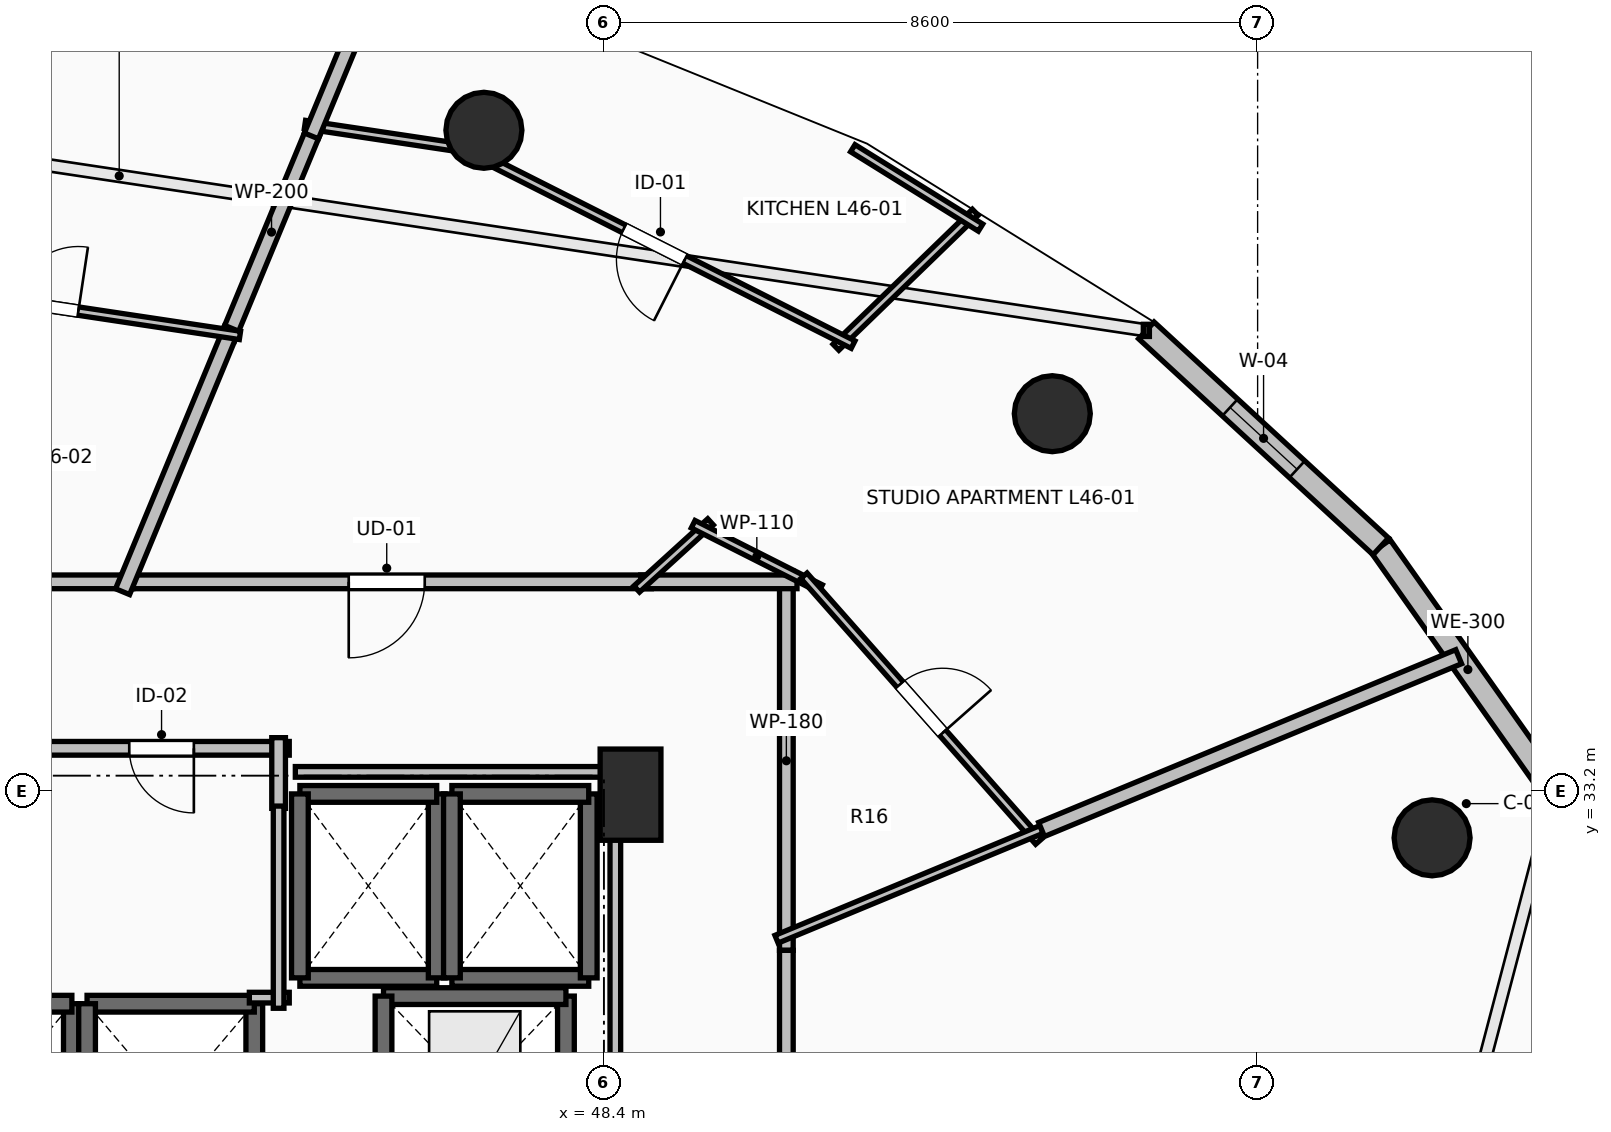
"""IFC4 building model, lengths in metres.
Left out: names, types, materials, properties, quantities, classifications, styles, units other than length and angle.
Written with IfcOpenShell. Run it as: python <this file> out.ifc"""

import sys

from ifc_helpers import new_model, si_unit, direction, frame, frame_2d, origin, origin_2d, place, context, subcontext, project, spatial, rectangle, circle, extrude, element, fill, save


model = new_model("IFC4")
c1 = context("Model", 3, precision=1e-05, world=origin(), true_north=direction((0.0, 1.0)))
c2 = subcontext(c1, "Body", "Model", "MODEL_VIEW")
j1 = project(units=[si_unit("LENGTHUNIT", "METRE"), si_unit("PLANEANGLEUNIT", "RADIAN")], contexts=[c1])
p1 = place(None, origin())
s1 = spatial("IfcSite", under=j1, at=p1, CompositionType="ELEMENT")
p2 = place(p1, origin())
s2 = spatial("IfcBuilding", under=s1, at=p2, CompositionType="ELEMENT")
p3 = place(p2, frame((0.0, 0.0, 171.1)))
s3 = spatial("IfcBuildingStorey", under=s2, at=p3, CompositionType="ELEMENT", Elevation=171.1)
for number, where, z_axis, x_axis in (
    (1, (59.295, 32.582, 0.0), (0.0, 0.0, 1.0), (0.924, 0.383, 0.0)),
    (2, (54.299, 38.162, 0.0), (0.0, 0.0, 1.0), (0.707, 0.707, 0.0)),
    (3, (46.821, 41.891, 0.0), (0.0, 0.0, 1.0), (0.383, 0.924, 0.0)),
):
    element("IfcColumn", number, at=place(p3, frame(where, z_axis=z_axis, x_axis=x_axis)), inside=s3, PredefinedType="COLUMN", context=c2, shape_type="SweptSolid", body=[
        extrude(circle(Radius=0.5, at=origin_2d()), origin(), (0.0, 0.0, 1.0), 3.5),
    ])
p4 = place(p3, frame((48.75, 33.15, 0.0), z_axis=(0.0, 0.0, 1.0), x_axis=(1.0, 0.0, 0.0)))
e4 = element("IfcColumn", 4, at=p4, inside=s3, PredefinedType="PILASTER", context=c2, shape_type="SweptSolid", body=[
    extrude(rectangle(XDim=0.8, YDim=1.2, at=origin_2d()), origin(), (0.0, 0.0, 1.0), 3.5),
])
p5 = place(p3, frame((60.912, 33.175, 0.0), z_axis=(0.0, 0.0, 1.0), x_axis=(-0.577269753207, 0.816553508371, 0.0)))
e5 = element("IfcWall", 5, at=p5, inside=s3, PredefinedType="STANDARD", context=c2, shape_type="SweptSolid", body=[
    extrude(rectangle(XDim=3.97, YDim=0.3, at=frame_2d((1.985, 0.0))), origin(), (0.0, 0.0, 1.0), 3.2),
])
p6 = place(p3, frame((58.62, 36.417, 0.0), z_axis=(0.0, 0.0, 1.0), x_axis=(-0.735477154165, 0.677549522693, 0.0)))
e6 = element("IfcWall", 6, at=p6, inside=s3, PredefinedType="STANDARD", context=c2, shape_type="SweptSolid", body=[
    extrude(rectangle(XDim=4.194, YDim=0.3, at=frame_2d((2.097, 0.0))), origin(), (0.0, 0.0, 1.0), 3.2),
])
p7 = place(p6, frame((1.497, 0.0, 0.85)))
e7 = element("IfcOpeningElement", 7, at=p7, cuts=e6, PredefinedType="OPENING", context=c2, shape_type="SweptSolid", body=[
    extrude(rectangle(XDim=1.2, YDim=1.95, at=frame_2d((0.6, 0.975))), frame((0.0, 0.165, 0.0), z_axis=(0.0, -1.0, 0.0), x_axis=(1.0, 0.0, 0.0)), (0.0, 0.0, 1.0), 0.33),
])
p8 = place(p3, frame((41.4, 27.8, 0.0), z_axis=(0.0, 0.0, 1.0), x_axis=(0.0, 1.0, 0.0)))
e8 = element("IfcWall", 8, at=p8, inside=s3, PredefinedType="SOLIDWALL", context=c2, shape_type="SweptSolid", body=[
    extrude(rectangle(XDim=2.6, YDim=0.22, at=frame_2d((1.3, 0.0))), origin(), (0.0, 0.0, 1.0), 3.2),
])
p9 = place(p3, frame((41.4, 30.4, 0.0), z_axis=(0.0, 0.0, 1.0), x_axis=(-1.0, 0.0, 0.0)))
e9 = element("IfcWall", 9, at=p9, inside=s3, PredefinedType="SOLIDWALL", context=c2, shape_type="SweptSolid", body=[
    extrude(rectangle(XDim=2.2, YDim=0.22, at=frame_2d((1.1, 0.0))), origin(), (0.0, 0.0, 1.0), 3.2),
])
p10 = place(p3, frame((43.8, 27.8, 0.0), z_axis=(0.0, 0.0, 1.0), x_axis=(0.0, 1.0, 0.0)))
e10 = element("IfcWall", 10, at=p10, inside=s3, PredefinedType="SOLIDWALL", context=c2, shape_type="SweptSolid", body=[
    extrude(rectangle(XDim=2.6, YDim=0.22, at=frame_2d((1.3, 0.0))), origin(), (0.0, 0.0, 1.0), 3.2),
])
p11 = place(p3, frame((43.8, 30.4, 0.0), z_axis=(0.0, 0.0, 1.0), x_axis=(-1.0, 0.0, 0.0)))
e11 = element("IfcWall", 11, at=p11, inside=s3, PredefinedType="SOLIDWALL", context=c2, shape_type="SweptSolid", body=[
    extrude(rectangle(XDim=2.2, YDim=0.22, at=frame_2d((1.1, 0.0))), origin(), (0.0, 0.0, 1.0), 3.2),
])
p12 = place(p3, frame((41.6, 30.4, 0.0), z_axis=(0.0, 0.0, 1.0), x_axis=(0.0, -1.0, 0.0)))
e12 = element("IfcWall", 12, at=p12, inside=s3, PredefinedType="SOLIDWALL", context=c2, shape_type="SweptSolid", body=[
    extrude(rectangle(XDim=2.6, YDim=0.22, at=frame_2d((1.3, 0.0))), origin(), (0.0, 0.0, 1.0), 3.2),
])
p13 = place(p3, frame((44.4, 30.74, 0.0), z_axis=(0.0, 0.0, 1.0), x_axis=(1.0, 0.0, 0.0)))
e13 = element("IfcWall", 13, at=p13, inside=s3, PredefinedType="SOLIDWALL", context=c2, shape_type="SweptSolid", body=[
    extrude(rectangle(XDim=1.8, YDim=0.22, at=frame_2d((0.9, 0.0))), origin(), (0.0, 0.0, 1.0), 3.2),
])
p14 = place(p3, frame((46.2, 30.74, 0.0), z_axis=(0.0, 0.0, 1.0), x_axis=(0.0, 1.0, 0.0)))
e14 = element("IfcWall", 14, at=p14, inside=s3, PredefinedType="SOLIDWALL", context=c2, shape_type="SweptSolid", body=[
    extrude(rectangle(XDim=2.42, YDim=0.22, at=frame_2d((1.21, 0.0))), origin(), (0.0, 0.0, 1.0), 3.2),
])
p15 = place(p3, frame((46.2, 33.16, 0.0), z_axis=(0.0, 0.0, 1.0), x_axis=(-1.0, 0.0, 0.0)))
e15 = element("IfcWall", 15, at=p15, inside=s3, PredefinedType="SOLIDWALL", context=c2, shape_type="SweptSolid", body=[
    extrude(rectangle(XDim=1.8, YDim=0.22, at=frame_2d((0.9, 0.0))), origin(), (0.0, 0.0, 1.0), 3.2),
])
p16 = place(p3, frame((44.4, 33.16, 0.0), z_axis=(0.0, 0.0, 1.0), x_axis=(0.0, -1.0, 0.0)))
e16 = element("IfcWall", 16, at=p16, inside=s3, PredefinedType="SOLIDWALL", context=c2, shape_type="SweptSolid", body=[
    extrude(rectangle(XDim=2.42, YDim=0.22, at=frame_2d((1.21, 0.0))), origin(), (0.0, 0.0, 1.0), 3.2),
])
p17 = place(p3, frame((46.4, 30.74, 0.0), z_axis=(0.0, 0.0, 1.0), x_axis=(1.0, 0.0, 0.0)))
e17 = element("IfcWall", 17, at=p17, inside=s3, PredefinedType="SOLIDWALL", context=c2, shape_type="SweptSolid", body=[
    extrude(rectangle(XDim=1.8, YDim=0.22, at=frame_2d((0.9, 0.0))), origin(), (0.0, 0.0, 1.0), 3.2),
])
p18 = place(p3, frame((48.2, 30.74, 0.0), z_axis=(0.0, 0.0, 1.0), x_axis=(0.0, 1.0, 0.0)))
e18 = element("IfcWall", 18, at=p18, inside=s3, PredefinedType="SOLIDWALL", context=c2, shape_type="SweptSolid", body=[
    extrude(rectangle(XDim=2.42, YDim=0.22, at=frame_2d((1.21, 0.0))), origin(), (0.0, 0.0, 1.0), 3.2),
])
p19 = place(p3, frame((48.2, 33.16, 0.0), z_axis=(0.0, 0.0, 1.0), x_axis=(-1.0, 0.0, 0.0)))
e19 = element("IfcWall", 19, at=p19, inside=s3, PredefinedType="SOLIDWALL", context=c2, shape_type="SweptSolid", body=[
    extrude(rectangle(XDim=1.8, YDim=0.22, at=frame_2d((0.9, 0.0))), origin(), (0.0, 0.0, 1.0), 3.2),
])
p20 = place(p3, frame((46.4, 33.16, 0.0), z_axis=(0.0, 0.0, 1.0), x_axis=(0.0, -1.0, 0.0)))
e20 = element("IfcWall", 20, at=p20, inside=s3, PredefinedType="SOLIDWALL", context=c2, shape_type="SweptSolid", body=[
    extrude(rectangle(XDim=2.42, YDim=0.22, at=frame_2d((1.21, 0.0))), origin(), (0.0, 0.0, 1.0), 3.2),
])
p21 = place(p3, frame((47.9, 28.0, 0.0), z_axis=(0.0, 0.0, 1.0), x_axis=(0.0, 1.0, 0.0)))
e21 = element("IfcWall", 21, at=p21, inside=s3, PredefinedType="SHEAR", context=c2, shape_type="SweptSolid", body=[
    extrude(rectangle(XDim=2.5, YDim=0.22, at=frame_2d((1.25, 0.0))), origin(), (0.0, 0.0, 1.0), 3.2),
])
p22 = place(p3, frame((47.9, 30.5, 0.0), z_axis=(0.0, 0.0, 1.0), x_axis=(-1.0, 0.0, 0.0)))
e22 = element("IfcWall", 22, at=p22, inside=s3, PredefinedType="SHEAR", context=c2, shape_type="SweptSolid", body=[
    extrude(rectangle(XDim=2.4, YDim=0.22, at=frame_2d((1.2, 0.0))), origin(), (0.0, 0.0, 1.0), 3.2),
])
p23 = place(p3, frame((45.5, 30.5, 0.0), z_axis=(0.0, 0.0, 1.0), x_axis=(0.0, -1.0, 0.0)))
e23 = element("IfcWall", 23, at=p23, inside=s3, PredefinedType="SHEAR", context=c2, shape_type="SweptSolid", body=[
    extrude(rectangle(XDim=2.5, YDim=0.22, at=frame_2d((1.25, 0.0))), origin(), (0.0, 0.0, 1.0), 3.2),
])
p24 = place(p3, frame((44.26, 33.76, 0.0), z_axis=(0.0, 0.0, 1.0), x_axis=(-1.0, 0.0, 0.0)))
e24 = element("IfcWall", 24, at=p24, inside=s3, PredefinedType="PARTITIONING", context=c2, shape_type="SweptSolid", body=[
    extrude(rectangle(XDim=3.36, YDim=0.18, at=frame_2d((1.68, 0.0))), origin(), (0.0, 0.0, 1.0), 3.2),
])
p25 = place(p24, frame((1.255, 0.0, 0.0)))
e25 = element("IfcOpeningElement", 25, at=p25, cuts=e24, PredefinedType="OPENING", context=c2, shape_type="SweptSolid", body=[
    extrude(rectangle(XDim=0.85, YDim=2.1, at=frame_2d((0.425, 1.05))), frame((0.0, 0.105, 0.0), z_axis=(0.0, -1.0, 0.0), x_axis=(1.0, 0.0, 0.0)), (0.0, 0.0, 1.0), 0.21),
])
p26 = place(p3, frame((44.12, 32.97, 0.0), z_axis=(0.0, 0.0, 1.0), x_axis=(0.0, 1.0, 0.0)))
e26 = element("IfcWall", 26, at=p26, inside=s3, PredefinedType="PARTITIONING", context=c2, shape_type="SweptSolid", body=[
    extrude(rectangle(XDim=0.93, YDim=0.18, at=frame_2d((0.465, 0.0))), origin(), (0.0, 0.0, 1.0), 3.2),
])
p27 = place(p3, frame((49.024, 35.95, 0.0), z_axis=(0.0, 0.0, 1.0), x_axis=(-1.0, 0.0, 0.0)))
e27 = element("IfcWall", 27, at=p27, inside=s3, PredefinedType="PARTITIONING", context=c2, shape_type="SweptSolid", body=[
    extrude(rectangle(XDim=6.963, YDim=0.18, at=frame_2d((3.481, 0.0))), origin(), (0.0, 0.0, 1.0), 2.392),
])
p28 = place(p27, frame((2.981, 0.0, 0.0)))
e28 = element("IfcOpeningElement", 28, at=p28, cuts=e27, PredefinedType="OPENING", context=c2, shape_type="SweptSolid", body=[
    extrude(rectangle(XDim=1.0, YDim=2.15, at=frame_2d((0.5, 1.075))), frame((0.0, 0.105, 0.0), z_axis=(0.0, -1.0, 0.0), x_axis=(1.0, 0.0, 0.0)), (0.0, 0.0, 1.0), 0.21),
])
p29 = place(p3, frame((50.8, 31.102, 0.0), z_axis=(0.0, 0.0, 1.0), x_axis=(0.0, 1.0, 0.0)))
e29 = element("IfcWall", 29, at=p29, inside=s3, PredefinedType="PARTITIONING", context=c2, shape_type="SweptSolid", body=[
    extrude(rectangle(XDim=4.988, YDim=0.18, at=frame_2d((2.494, 0.0))), origin(), (0.0, 0.0, 1.0), 2.392),
])
p30 = place(p3, frame((50.94, 35.95, 0.0), z_axis=(0.0, 0.0, 1.0), x_axis=(-1.0, 0.0, 0.0)))
e30 = element("IfcWall", 30, at=p30, inside=s3, PredefinedType="PARTITIONING", context=c2, shape_type="SweptSolid", body=[
    extrude(rectangle(XDim=2.056, YDim=0.18, at=frame_2d((1.028, 0.0))), origin(), (0.0, 0.0, 1.0), 2.834),
])
p31 = place(p3, frame((42.201, 35.95, 0.0), z_axis=(0.0, 0.0, 1.0), x_axis=(-1.0, 0.0, 0.0)))
e31 = element("IfcWall", 31, at=p31, inside=s3, PredefinedType="PARTITIONING", context=c2, shape_type="SweptSolid", body=[
    extrude(rectangle(XDim=3.812, YDim=0.18, at=frame_2d((1.906, 0.0))), origin(), (0.0, 0.0, 1.0), 3.2),
])
p32 = place(p3, frame((50.8, 27.25, 0.0), z_axis=(0.0, 0.0, 1.0), x_axis=(0.0, 1.0, 0.0)))
e32 = element("IfcWall", 32, at=p32, inside=s3, PredefinedType="PARTITIONING", context=c2, shape_type="SweptSolid", body=[
    extrude(rectangle(XDim=3.852, YDim=0.18, at=frame_2d((1.926, 0.0))), origin(), (0.0, 0.0, 1.0), 2.392),
])
p33 = place(p3, frame((48.831, 35.856, 0.0), z_axis=(0.0, 0.0, 1.0), x_axis=(0.739696022243, 0.672941152463, 0.0)))
e33 = element("IfcWall", 33, at=p33, inside=s3, PredefinedType="PARTITIONING", context=c2, shape_type="SweptSolid", body=[
    extrude(rectangle(XDim=1.313, YDim=0.11, at=frame_2d((0.656, 0.0))), origin(), (0.0, 0.0, 1.0), 2.834),
])
p34 = place(p3, frame((49.574, 36.708, 0.0), z_axis=(0.0, 0.0, 1.0), x_axis=(0.8925722309, -0.450904438464, 0.0)))
e34 = element("IfcWall", 34, at=p34, inside=s3, PredefinedType="PARTITIONING", context=c2, shape_type="SweptSolid", body=[
    extrude(rectangle(XDim=1.877, YDim=0.11, at=frame_2d((0.938, 0.0))), origin(), (0.0, 0.0, 1.0), 3.2),
])
p35 = place(p3, frame((51.031, 36.03, 0.0), z_axis=(0.0, 0.0, 1.0), x_axis=(0.662223763999, -0.749306136632, 0.0)))
e35 = element("IfcWall", 35, at=p35, inside=s3, PredefinedType="PARTITIONING", context=c2, shape_type="SweptSolid", body=[
    extrude(rectangle(XDim=4.665, YDim=0.11, at=frame_2d((2.333, 0.0))), origin(), (0.0, 0.0, 1.0), 2.392),
])
p36 = place(p35, frame((1.908, 0.0, 0.0)))
e36 = element("IfcOpeningElement", 36, at=p36, cuts=e35, PredefinedType="OPENING", context=c2, shape_type="SweptSolid", body=[
    extrude(rectangle(XDim=0.85, YDim=2.1, at=frame_2d((0.425, 1.05))), frame((0.0, 0.07, 0.0), z_axis=(0.0, -1.0, 0.0), x_axis=(1.0, 0.0, 0.0)), (0.0, 0.0, 1.0), 0.14),
])
p37 = place(p3, frame((54.157, 32.693, 0.0), z_axis=(0.0, 0.0, 1.0), x_axis=(-0.923865440054, -0.382717452795, 0.0)))
e37 = element("IfcWall", 37, at=p37, inside=s3, PredefinedType="PARTITIONING", context=c2, shape_type="SweptSolid", body=[
    extrude(rectangle(XDim=3.774, YDim=0.11, at=frame_2d((1.887, 0.0))), origin(), (0.0, 0.0, 1.0), 2.392),
])
p38 = place(p3, frame((53.286, 40.812, 0.0), z_axis=(0.0, 0.0, 1.0), x_axis=(-0.718256654627, -0.69577825353, 0.0)))
e38 = element("IfcWall", 38, at=p38, inside=s3, PredefinedType="PARTITIONING", context=c2, shape_type="SweptSolid", body=[
    extrude(rectangle(XDim=2.552, YDim=0.11, at=frame_2d((1.276, 0.0))), origin(), (0.0, 0.0, 1.0), 2.688),
])
p39 = place(p3, frame((51.678, 39.071, 0.0), z_axis=(0.0, 0.0, 1.0), x_axis=(-0.892519613246, 0.451008580818, 0.0)))
e39 = element("IfcWall", 39, at=p39, inside=s3, PredefinedType="PARTITIONING", context=c2, shape_type="SweptSolid", body=[
    extrude(rectangle(XDim=5.861, YDim=0.11, at=frame_2d((2.93, 0.0))), origin(), (0.0, 0.0, 1.0), 2.392),
])
p40 = place(p39, frame((2.48, 0.0, 0.0)))
e40 = element("IfcOpeningElement", 40, at=p40, cuts=e39, PredefinedType="OPENING", context=c2, shape_type="SweptSolid", body=[
    extrude(rectangle(XDim=0.9, YDim=2.1, at=frame_2d((0.45, 1.05))), frame((0.0, 0.07, 0.0), z_axis=(0.0, -1.0, 0.0), x_axis=(1.0, 0.0, 0.0)), (0.0, 0.0, 1.0), 0.14),
])
p41 = place(p3, frame((46.71, 41.63, 0.0), z_axis=(0.0, 0.0, 1.0), x_axis=(-0.988930827604, 0.14837728335, 0.0)))
e41 = element("IfcWall", 41, at=p41, inside=s3, PredefinedType="PARTITIONING", context=c2, shape_type="SweptSolid", body=[
    extrude(rectangle(XDim=2.269, YDim=0.11, at=frame_2d((1.135, 0.0))), origin(), (0.0, 0.0, 1.0), 3.2),
])
p42 = place(p3, frame((53.355, 40.61, 0.0), z_axis=(0.0, 0.0, 1.0), x_axis=(-0.8493331579, 0.527857165237, 0.0)))
e42 = element("IfcWall", 42, at=p42, inside=s3, PredefinedType="PARTITIONING", context=c2, shape_type="SweptSolid", body=[
    extrude(rectangle(XDim=1.979, YDim=0.11, at=frame_2d((0.99, 0.0))), origin(), (0.0, 0.0, 1.0), 3.2),
])
p43 = place(p3, frame((44.605, 41.946, 0.0), z_axis=(0.0, 0.0, 1.0), x_axis=(-0.382777783416, -0.923840445382, 0.0)))
e43 = element("IfcWall", 43, at=p43, inside=s3, PredefinedType="PARTITIONING", context=c2, shape_type="SweptSolid", body=[
    extrude(rectangle(XDim=3.02, YDim=0.2, at=frame_2d((1.51, 0.0))), origin(), (0.0, 0.0, 1.0), 2.889),
])
p44 = place(p3, frame((43.503, 39.285, 0.0), z_axis=(0.0, 0.0, 1.0), x_axis=(-0.382867331148, -0.923803337697, 0.0)))
e44 = element("IfcWall", 44, at=p44, inside=s3, PredefinedType="PARTITIONING", context=c2, shape_type="SweptSolid", body=[
    extrude(rectangle(XDim=3.75, YDim=0.2, at=frame_2d((1.875, 0.0))), origin(), (0.0, 0.0, 1.0), 2.834),
])
p45 = place(p3, frame((54.157, 32.692, 0.0), z_axis=(0.0, 0.0, 1.0), x_axis=(0.923898107484, 0.382638585335, 0.0)))
e45 = element("IfcWall", 45, at=p45, inside=s3, PredefinedType="PARTITIONING", context=c2, shape_type="SweptSolid", body=[
    extrude(rectangle(XDim=5.939, YDim=0.2, at=frame_2d((2.97, 0.0))), origin(), (0.0, 0.0, 1.0), 2.392),
])
p46 = place(p3, frame((45.43, 43.936, 0.0), z_axis=(0.0, 0.0, 1.0), x_axis=(-0.382755897173, -0.923849513276, 0.0)))
e46 = element("IfcWall", 46, at=p46, inside=s3, PredefinedType="PARTITIONING", context=c2, shape_type="SweptSolid", body=[
    extrude(rectangle(XDim=2.294, YDim=0.2, at=frame_2d((1.147, 0.0))), origin(), (0.0, 0.0, 1.0), 2.688),
])
p47 = place(p3, frame((38.519, 39.958, 0.0), z_axis=(0.0, 0.0, 1.0), x_axis=(0.988887618714, -0.14866498429, 0.0)))
e47 = element("IfcWall", 47, at=p47, inside=s3, PredefinedType="PARTITIONING", context=c2, shape_type="SweptSolid", body=[
    extrude(rectangle(XDim=5.15, YDim=0.11, at=frame_2d((2.575, 0.0))), origin(), (0.0, 0.0, 1.0), 2.889),
])
p48 = place(p47, frame((2.15, 0.0, 0.0)))
e48 = element("IfcOpeningElement", 48, at=p48, cuts=e47, PredefinedType="OPENING", context=c2, shape_type="SweptSolid", body=[
    extrude(rectangle(XDim=0.85, YDim=2.1, at=frame_2d((0.425, 1.05))), frame((0.0, 0.07, 0.0), z_axis=(0.0, -1.0, 0.0), x_axis=(1.0, 0.0, 0.0)), (0.0, 0.0, 1.0), 0.14),
])
p49 = place(p3, frame((43.735, 30.48, 0.0), z_axis=(0.0, 0.0, 1.0), x_axis=(1.0, 0.0, 0.0)))
e49 = element("IfcWall", 49, at=p49, inside=s3, PredefinedType="PARTITIONING", context=c2, shape_type="SweptSolid", body=[
    extrude(rectangle(XDim=0.525, YDim=0.14, at=frame_2d((0.262, 0.0))), origin(), (0.0, 0.0, 1.0), 3.2),
])
p50 = place(p3, frame((44.12, 30.34, 0.0), z_axis=(0.0, 0.0, 1.0), x_axis=(0.0, 1.0, 0.0)))
e50 = element("IfcWall", 50, at=p50, inside=s3, PredefinedType="PARTITIONING", context=c2, shape_type="SweptSolid", body=[
    extrude(rectangle(XDim=2.66, YDim=0.14, at=frame_2d((1.33, 0.0))), origin(), (0.0, 0.0, 1.0), 3.2),
])
p51 = place(p3, frame((48.55, 28.196, 0.0), z_axis=(0.0, 0.0, 1.0), x_axis=(0.0, 1.0, 0.0)))
e51 = element("IfcWall", 51, at=p51, inside=s3, PredefinedType="PARTITIONING", context=c2, shape_type="SweptSolid", body=[
    extrude(rectangle(XDim=5.254, YDim=0.14, at=frame_2d((2.627, 0.0))), origin(), (0.0, 0.0, 1.0), 2.392),
])
p52 = place(p3, frame((48.55, 33.45, 0.0), z_axis=(0.0, 0.0, 1.0), x_axis=(-1.0, 0.0, 0.0)))
e52 = element("IfcWall", 52, at=p52, inside=s3, PredefinedType="PARTITIONING", context=c2, shape_type="SweptSolid", body=[
    extrude(rectangle(XDim=4.21, YDim=0.14, at=frame_2d((2.105, 0.0))), origin(), (0.0, 0.0, 1.0), 2.392),
])
p53 = place(p7, origin())
e53 = element("IfcWindow", 53, at=p53, inside=s3, PartitioningType="SINGLE_PANEL", PredefinedType="WINDOW", context=c2, shape_type="SweptSolid", body=[
    extrude(rectangle(XDim=1.2, YDim=1.95, at=frame_2d((0.6, 0.975))), frame((0.0, 0.03, 0.0), z_axis=(0.0, -1.0, 0.0), x_axis=(1.0, 0.0, 0.0)), (0.0, 0.0, 1.0), 0.06),
])
fill(e7, e53)
p54 = place(p25, origin())
e54 = element("IfcDoor", 54, at=p54, inside=s3, OperationType="SINGLE_SWING_LEFT", PredefinedType="DOOR", context=c2, shape_type="SweptSolid", body=[
    extrude(rectangle(XDim=0.85, YDim=2.1, at=frame_2d((0.425, 1.05))), frame((0.0, 0.025, 0.0), z_axis=(0.0, -1.0, 0.0), x_axis=(1.0, 0.0, 0.0)), (0.0, 0.0, 1.0), 0.05),
])
fill(e25, e54)
p55 = place(p28, origin())
e55 = element("IfcDoor", 55, at=p55, inside=s3, OperationType="SINGLE_SWING_RIGHT", PredefinedType="DOOR", context=c2, shape_type="SweptSolid", body=[
    extrude(rectangle(XDim=1.0, YDim=2.15, at=frame_2d((0.5, 1.075))), frame((0.0, 0.025, 0.0), z_axis=(0.0, -1.0, 0.0), x_axis=(1.0, 0.0, 0.0)), (0.0, 0.0, 1.0), 0.05),
])
fill(e28, e55)
p56 = place(p36, origin())
e56 = element("IfcDoor", 56, at=p56, inside=s3, OperationType="SINGLE_SWING_RIGHT", PredefinedType="DOOR", context=c2, shape_type="SweptSolid", body=[
    extrude(rectangle(XDim=0.85, YDim=2.1, at=frame_2d((0.425, 1.05))), frame((0.0, 0.025, 0.0), z_axis=(0.0, -1.0, 0.0), x_axis=(1.0, 0.0, 0.0)), (0.0, 0.0, 1.0), 0.05),
])
fill(e36, e56)
p57 = place(p40, origin())
e57 = element("IfcDoor", 57, at=p57, inside=s3, OperationType="SINGLE_SWING_LEFT", PredefinedType="DOOR", context=c2, shape_type="SweptSolid", body=[
    extrude(rectangle(XDim=0.9, YDim=2.1, at=frame_2d((0.45, 1.05))), frame((0.0, 0.025, 0.0), z_axis=(0.0, -1.0, 0.0), x_axis=(1.0, 0.0, 0.0)), (0.0, 0.0, 1.0), 0.05),
])
fill(e40, e57)
p58 = place(p48, origin())
e58 = element("IfcDoor", 58, at=p58, inside=s3, OperationType="SINGLE_SWING_RIGHT", PredefinedType="DOOR", context=c2, shape_type="SweptSolid", body=[
    extrude(rectangle(XDim=0.85, YDim=2.1, at=frame_2d((0.425, 1.05))), frame((0.0, 0.025, 0.0), z_axis=(0.0, -1.0, 0.0), x_axis=(1.0, 0.0, 0.0)), (0.0, 0.0, 1.0), 0.05),
])
fill(e48, e58)
save(model, sys.argv[1])
